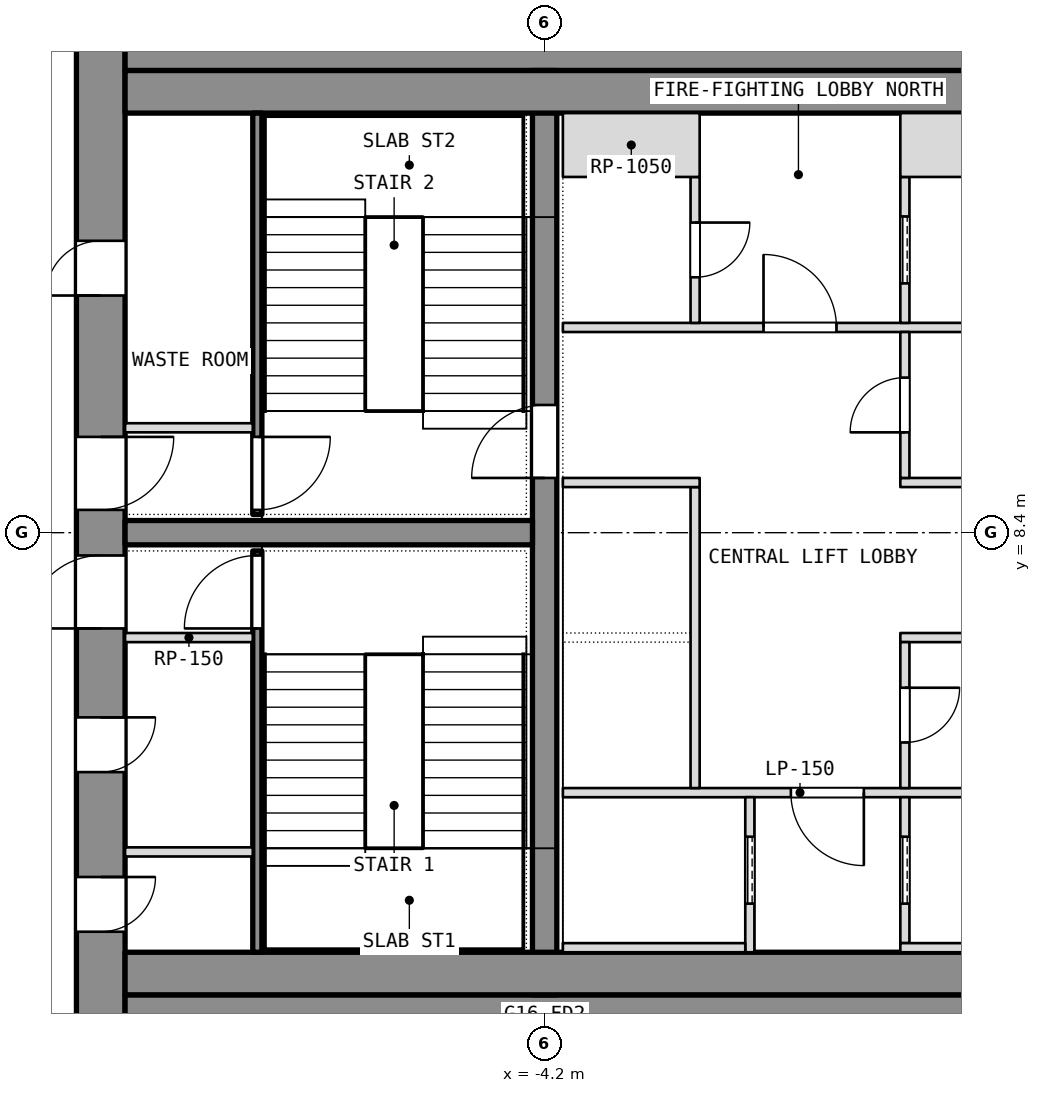
"""IFC4 building model, lengths in metres.
Left out: names, types, materials, properties, quantities, classifications, styles, units other than length and angle.
Written with IfcOpenShell. Run it as: python <this file> out.ifc"""

import sys

from ifc_helpers import new_model, si_unit, direction, frame, frame_2d, origin, place, context, subcontext, project, spatial, rectangle, extrude, element, fill, save


model = new_model("IFC4")
c1 = context("Model", 3, precision=1e-05, world=origin(), true_north=direction((0.0, 1.0)))
c2 = subcontext(c1, "Body", "Model", "MODEL_VIEW")
j1 = project(units=[si_unit("LENGTHUNIT", "METRE"), si_unit("PLANEANGLEUNIT", "RADIAN")], contexts=[c1])
p1 = place(None, origin())
s1 = spatial("IfcSite", under=j1, at=p1, CompositionType="ELEMENT")
p2 = place(p1, origin())
s2 = spatial("IfcBuilding", under=s1, at=p2, CompositionType="ELEMENT")
p3 = place(p2, frame((0.0, 0.0, 198.5)))
s3 = spatial("IfcBuildingStorey", under=s2, at=p3, CompositionType="ELEMENT", Elevation=198.5)
p4 = place(p3, frame((-11.5, 0.0, 0.0), z_axis=(0.0, 0.0, 1.0), x_axis=(0.0, 1.0, 0.0)))
e1 = element("IfcWall", 1, at=p4, inside=s3, PredefinedType="SHEAR", context=c2, shape_type="SweptSolid", body=[
    extrude(rectangle(XDim=16.8, YDim=0.8, at=frame_2d((8.4, 0.0))), origin(), (0.0, 0.0, 1.0), 3.6),
])
p5 = place(p4, frame((1.837, 0.0, 0.0)))
e2 = element("IfcOpeningElement", 2, at=p5, cuts=e1, PredefinedType="OPENING", context=c2, shape_type="SweptSolid", body=[
    extrude(rectangle(XDim=0.9, YDim=2.1, at=frame_2d((0.45, 1.05))), frame((0.0, 0.4, 0.0), z_axis=(0.0, -1.0, 0.0), x_axis=(1.0, 0.0, 0.0)), (0.0, 0.0, 1.0), 0.8),
])
p6 = place(p4, frame((4.462, 0.0, 0.0)))
e3 = element("IfcOpeningElement", 3, at=p6, cuts=e1, PredefinedType="OPENING", context=c2, shape_type="SweptSolid", body=[
    extrude(rectangle(XDim=0.9, YDim=2.1, at=frame_2d((0.45, 1.05))), frame((0.0, 0.4, 0.0), z_axis=(0.0, -1.0, 0.0), x_axis=(1.0, 0.0, 0.0)), (0.0, 0.0, 1.0), 0.8),
])
p7 = place(p4, frame((6.825, 0.0, 0.0)))
e4 = element("IfcOpeningElement", 4, at=p7, cuts=e1, PredefinedType="OPENING", context=c2, shape_type="SweptSolid", body=[
    extrude(rectangle(XDim=1.2, YDim=2.1, at=frame_2d((0.6, 1.05))), frame((0.0, 0.4, 0.0), z_axis=(0.0, -1.0, 0.0), x_axis=(1.0, 0.0, 0.0)), (0.0, 0.0, 1.0), 0.8),
])
p8 = place(p4, frame((12.3, 0.0, 0.0)))
e5 = element("IfcOpeningElement", 5, at=p8, cuts=e1, PredefinedType="OPENING", context=c2, shape_type="SweptSolid", body=[
    extrude(rectangle(XDim=0.9, YDim=2.1, at=frame_2d((0.45, 1.05))), frame((0.0, 0.4, 0.0), z_axis=(0.0, -1.0, 0.0), x_axis=(1.0, 0.0, 0.0)), (0.0, 0.0, 1.0), 0.8),
])
p9 = place(p4, frame((8.775, 0.0, 0.0)))
e6 = element("IfcOpeningElement", 6, at=p9, cuts=e1, PredefinedType="OPENING", context=c2, shape_type="SweptSolid", body=[
    extrude(rectangle(XDim=1.2, YDim=2.1, at=frame_2d((0.6, 1.05))), frame((0.0, 0.4, 0.0), z_axis=(0.0, -1.0, 0.0), x_axis=(1.0, 0.0, 0.0)), (0.0, 0.0, 1.0), 0.8),
])
for number, where, z_axis, x_axis in (
    (7, (-11.1, 0.4, 0.0), (0.0, 0.0, 1.0), (1.0, 0.0, 0.0)),
    (8, (-11.1, 16.4, 0.0), (0.0, 0.0, 1.0), (1.0, 0.0, 0.0)),
):
    element("IfcWall", number, at=place(p3, frame(where, z_axis=z_axis, x_axis=x_axis)), inside=s3, PredefinedType="SHEAR", context=c2, shape_type="SweptSolid", body=[
        extrude(rectangle(XDim=22.2, YDim=0.8, at=frame_2d((11.1, 0.0))), origin(), (0.0, 0.0, 1.0), 3.6),
    ])
p10 = place(p3, frame((-4.2, 0.8, 0.0), z_axis=(0.0, 0.0, 1.0), x_axis=(0.0, 1.0, 0.0)))
e9 = element("IfcWall", 9, at=p10, inside=s3, PredefinedType="SHEAR", context=c2, shape_type="SweptSolid", body=[
    extrude(rectangle(XDim=15.2, YDim=0.4, at=frame_2d((7.6, 0.0))), origin(), (0.0, 0.0, 1.0), 3.6),
])
p11 = place(p10, frame((8.5, 0.0, 0.0)))
e10 = element("IfcOpeningElement", 10, at=p11, cuts=e9, PredefinedType="OPENING", context=c2, shape_type="SweptSolid", body=[
    extrude(rectangle(XDim=1.2, YDim=2.1, at=frame_2d((0.6, 1.05))), frame((0.0, 0.2, 0.0), z_axis=(0.0, -1.0, 0.0), x_axis=(1.0, 0.0, 0.0)), (0.0, 0.0, 1.0), 0.4),
])
p12 = place(p3, frame((-11.1, 8.4, 0.0), z_axis=(0.0, 0.0, 1.0), x_axis=(1.0, 0.0, 0.0)))
e11 = element("IfcWall", 11, at=p12, inside=s3, PredefinedType="SHEAR", context=c2, shape_type="SweptSolid", body=[
    extrude(rectangle(XDim=6.7, YDim=0.4, at=frame_2d((3.35, 0.0))), origin(), (0.0, 0.0, 1.0), 3.6),
])
for number, where, z_axis, x_axis in (
    (12, (-11.1, 1.15, 0.0), (0.0, 0.0, 1.0), (1.0, 0.0, 0.0)),
    (13, (-11.1, 15.65, 0.0), (0.0, 0.0, 1.0), (1.0, 0.0, 0.0)),
):
    element("IfcWall", number, at=place(p3, frame(where, z_axis=z_axis, x_axis=x_axis)), inside=s3, PredefinedType="PARTITIONING", context=c2, shape_type="SweptSolid", body=[
        extrude(rectangle(XDim=22.2, YDim=0.7, at=frame_2d((11.1, 0.0))), origin(), (0.0, 0.0, 1.0), 3.34),
    ])
p13 = place(p3, frame((-8.925, 1.5, 0.0), z_axis=(0.0, 0.0, 1.0), x_axis=(0.0, 1.0, 0.0)))
e14 = element("IfcWall", 14, at=p13, inside=s3, PredefinedType="SHEAR", context=c2, shape_type="SweptSolid", body=[
    extrude(rectangle(XDim=6.6, YDim=0.15, at=frame_2d((3.3, 0.0))), origin(), (0.0, 0.0, 1.0), 3.34),
])
p14 = place(p13, frame((5.325, 0.0, 0.0)))
e15 = element("IfcOpeningElement", 15, at=p14, cuts=e14, PredefinedType="OPENING", context=c2, shape_type="SweptSolid", body=[
    extrude(rectangle(XDim=1.2, YDim=2.1, at=frame_2d((0.6, 1.05))), frame((0.0, 0.075, 0.0), z_axis=(0.0, -1.0, 0.0), x_axis=(1.0, 0.0, 0.0)), (0.0, 0.0, 1.0), 0.15),
])
for number, where, z_axis, x_axis in (
    (16, (-11.1, 6.675, 0.0), (0.0, 0.0, 1.0), (1.0, 0.0, 0.0)),
    (17, (-11.1, 3.15, 0.0), (0.0, 0.0, 1.0), (1.0, 0.0, 0.0)),
):
    element("IfcWall", number, at=place(p3, frame(where, z_axis=z_axis, x_axis=x_axis)), inside=s3, PredefinedType="PARTITIONING", context=c2, shape_type="SweptSolid", body=[
        extrude(rectangle(XDim=2.1, YDim=0.15, at=frame_2d((1.05, 0.0))), origin(), (0.0, 0.0, 1.0), 3.34),
    ])
p15 = place(p3, frame((-8.925, 8.7, 0.0), z_axis=(0.0, 0.0, 1.0), x_axis=(0.0, 1.0, 0.0)))
e18 = element("IfcWall", 18, at=p15, inside=s3, PredefinedType="SHEAR", context=c2, shape_type="SweptSolid", body=[
    extrude(rectangle(XDim=6.6, YDim=0.15, at=frame_2d((3.3, 0.0))), origin(), (0.0, 0.0, 1.0), 3.34),
])
p16 = place(p15, frame((0.075, 0.0, 0.0)))
e19 = element("IfcOpeningElement", 19, at=p16, cuts=e18, PredefinedType="OPENING", context=c2, shape_type="SweptSolid", body=[
    extrude(rectangle(XDim=1.2, YDim=2.1, at=frame_2d((0.6, 1.05))), frame((0.0, 0.075, 0.0), z_axis=(0.0, -1.0, 0.0), x_axis=(1.0, 0.0, 0.0)), (0.0, 0.0, 1.0), 0.15),
])
p17 = place(p3, frame((-11.1, 10.125, 0.0), z_axis=(0.0, 0.0, 1.0), x_axis=(1.0, 0.0, 0.0)))
e20 = element("IfcWall", 20, at=p17, inside=s3, PredefinedType="PARTITIONING", context=c2, shape_type="SweptSolid", body=[
    extrude(rectangle(XDim=2.1, YDim=0.15, at=frame_2d((1.05, 0.0))), origin(), (0.0, 0.0, 1.0), 3.34),
])
p18 = place(p3, frame((-3.9, 4.125, 0.0), z_axis=(0.0, 0.0, 1.0), x_axis=(1.0, 0.0, 0.0)))
e21 = element("IfcWall", 21, at=p18, inside=s3, PredefinedType="PARTITIONING", context=c2, shape_type="SweptSolid", body=[
    extrude(rectangle(XDim=7.8, YDim=0.15, at=frame_2d((3.9, 0.0))), origin(), (0.0, 0.0, 1.0), 3.34),
])
p19 = place(p18, frame((3.75, 0.0, 0.0)))
e22 = element("IfcOpeningElement", 22, at=p19, cuts=e21, PredefinedType="OPENING", context=c2, shape_type="SweptSolid", body=[
    extrude(rectangle(XDim=1.2, YDim=2.1, at=frame_2d((0.6, 1.05))), frame((0.0, 0.075, 0.0), z_axis=(0.0, -1.0, 0.0), x_axis=(1.0, 0.0, 0.0)), (0.0, 0.0, 1.0), 0.15),
])
p20 = place(p3, frame((-3.9, 11.775, 0.0), z_axis=(0.0, 0.0, 1.0), x_axis=(1.0, 0.0, 0.0)))
e23 = element("IfcWall", 23, at=p20, inside=s3, PredefinedType="PARTITIONING", context=c2, shape_type="SweptSolid", body=[
    extrude(rectangle(XDim=7.8, YDim=0.15, at=frame_2d((3.9, 0.0))), origin(), (0.0, 0.0, 1.0), 3.34),
])
p21 = place(p20, frame((3.3, 0.0, 0.0)))
e24 = element("IfcOpeningElement", 24, at=p21, cuts=e23, PredefinedType="OPENING", context=c2, shape_type="SweptSolid", body=[
    extrude(rectangle(XDim=1.2, YDim=2.1, at=frame_2d((0.6, 1.05))), frame((0.0, 0.075, 0.0), z_axis=(0.0, -1.0, 0.0), x_axis=(1.0, 0.0, 0.0)), (0.0, 0.0, 1.0), 0.15),
])
p22 = place(p3, frame((-0.825, 1.5, 0.0), z_axis=(0.0, 0.0, 1.0), x_axis=(0.0, 1.0, 0.0)))
e25 = element("IfcWall", 25, at=p22, inside=s3, PredefinedType="SHEAR", context=c2, shape_type="SweptSolid", body=[
    extrude(rectangle(XDim=2.55, YDim=0.15, at=frame_2d((1.275, 0.0))), origin(), (0.0, 0.0, 1.0), 3.6),
])
p23 = place(p22, frame((0.8, 0.0, 0.0)))
e26 = element("IfcOpeningElement", 26, at=p23, cuts=e25, PredefinedType="OPENING", context=c2, shape_type="SweptSolid", body=[
    extrude(rectangle(XDim=1.1, YDim=2.1, at=frame_2d((0.55, 1.05))), frame((0.0, 0.075, 0.0), z_axis=(0.0, -1.0, 0.0), x_axis=(1.0, 0.0, 0.0)), (0.0, 0.0, 1.0), 0.15),
])
p24 = place(p3, frame((-3.9, 1.575, 0.0), z_axis=(0.0, 0.0, 1.0), x_axis=(1.0, 0.0, 0.0)))
e27 = element("IfcWall", 27, at=p24, inside=s3, PredefinedType="SHEAR", context=c2, shape_type="SweptSolid", body=[
    extrude(rectangle(XDim=3.0, YDim=0.15, at=frame_2d((1.5, 0.0))), origin(), (0.0, 0.0, 1.0), 3.6),
])
p25 = place(p3, frame((-1.725, 4.2, 0.0), z_axis=(0.0, 0.0, 1.0), x_axis=(0.0, 1.0, 0.0)))
e28 = element("IfcWall", 28, at=p25, inside=s3, PredefinedType="SHEAR", context=c2, shape_type="SweptSolid", body=[
    extrude(rectangle(XDim=4.95, YDim=0.15, at=frame_2d((2.475, 0.0))), origin(), (0.0, 0.0, 1.0), 3.6),
])
p26 = place(p3, frame((-3.9, 9.225, 0.0), z_axis=(0.0, 0.0, 1.0), x_axis=(1.0, 0.0, 0.0)))
e29 = element("IfcWall", 29, at=p26, inside=s3, PredefinedType="SHEAR", context=c2, shape_type="SweptSolid", body=[
    extrude(rectangle(XDim=2.25, YDim=0.15, at=frame_2d((1.125, 0.0))), origin(), (0.0, 0.0, 1.0), 3.6),
])
p27 = place(p3, frame((-1.725, 11.85, 0.0), z_axis=(0.0, 0.0, 1.0), x_axis=(0.0, 1.0, 0.0)))
e30 = element("IfcWall", 30, at=p27, inside=s3, PredefinedType="PARTITIONING", context=c2, shape_type="SweptSolid", body=[
    extrude(rectangle(XDim=2.4, YDim=0.15, at=frame_2d((1.2, 0.0))), origin(), (0.0, 0.0, 1.0), 3.34),
])
p28 = place(p27, frame((0.75, 0.0, 0.0)))
e31 = element("IfcOpeningElement", 31, at=p28, cuts=e30, PredefinedType="OPENING", context=c2, shape_type="SweptSolid", body=[
    extrude(rectangle(XDim=0.9, YDim=2.1, at=frame_2d((0.45, 1.05))), frame((0.0, 0.075, 0.0), z_axis=(0.0, -1.0, 0.0), x_axis=(1.0, 0.0, 0.0)), (0.0, 0.0, 1.0), 0.15),
])
p29 = place(p3, frame((-3.9, 14.775, 0.0), z_axis=(0.0, 0.0, 1.0), x_axis=(1.0, 0.0, 0.0)))
e32 = element("IfcWall", 32, at=p29, inside=s3, PredefinedType="PARTITIONING", context=c2, shape_type="SweptSolid", body=[
    extrude(rectangle(XDim=2.25, YDim=1.05, at=frame_2d((1.125, 0.0))), origin(), (0.0, 0.0, 1.0), 3.34),
])
p30 = place(p3, frame((1.725, 1.65, 0.0), z_axis=(0.0, 0.0, 1.0), x_axis=(0.0, 1.0, 0.0)))
e33 = element("IfcWall", 33, at=p30, inside=s3, PredefinedType="SHEAR", context=c2, shape_type="SweptSolid", body=[
    extrude(rectangle(XDim=2.4, YDim=0.15, at=frame_2d((1.2, 0.0))), origin(), (0.0, 0.0, 1.0), 3.6),
])
p31 = place(p30, frame((0.65, 0.0, 0.0)))
e34 = element("IfcOpeningElement", 34, at=p31, cuts=e33, PredefinedType="OPENING", context=c2, shape_type="SweptSolid", body=[
    extrude(rectangle(XDim=1.1, YDim=2.1, at=frame_2d((0.55, 1.05))), frame((0.0, 0.075, 0.0), z_axis=(0.0, -1.0, 0.0), x_axis=(1.0, 0.0, 0.0)), (0.0, 0.0, 1.0), 0.15),
])
p32 = place(p3, frame((1.65, 1.575, 0.0), z_axis=(0.0, 0.0, 1.0), x_axis=(1.0, 0.0, 0.0)))
e35 = element("IfcWall", 35, at=p32, inside=s3, PredefinedType="SHEAR", context=c2, shape_type="SweptSolid", body=[
    extrude(rectangle(XDim=2.25, YDim=0.15, at=frame_2d((1.125, 0.0))), origin(), (0.0, 0.0, 1.0), 3.6),
])
p33 = place(p3, frame((1.725, 11.85, 0.0), z_axis=(0.0, 0.0, 1.0), x_axis=(0.0, 1.0, 0.0)))
e36 = element("IfcWall", 36, at=p33, inside=s3, PredefinedType="SHEAR", context=c2, shape_type="SweptSolid", body=[
    extrude(rectangle(XDim=2.4, YDim=0.15, at=frame_2d((1.2, 0.0))), origin(), (0.0, 0.0, 1.0), 3.6),
])
p34 = place(p33, frame((0.65, 0.0, 0.0)))
e37 = element("IfcOpeningElement", 37, at=p34, cuts=e36, PredefinedType="OPENING", context=c2, shape_type="SweptSolid", body=[
    extrude(rectangle(XDim=1.1, YDim=2.1, at=frame_2d((0.55, 1.05))), frame((0.0, 0.075, 0.0), z_axis=(0.0, -1.0, 0.0), x_axis=(1.0, 0.0, 0.0)), (0.0, 0.0, 1.0), 0.15),
])
p35 = place(p3, frame((1.65, 14.775, 0.0), z_axis=(0.0, 0.0, 1.0), x_axis=(1.0, 0.0, 0.0)))
e38 = element("IfcWall", 38, at=p35, inside=s3, PredefinedType="SHEAR", context=c2, shape_type="SweptSolid", body=[
    extrude(rectangle(XDim=2.25, YDim=1.05, at=frame_2d((1.125, 0.0))), origin(), (0.0, 0.0, 1.0), 3.6),
])
for number, where, z_axis, x_axis in (
    (39, (1.65, 6.675, 0.0), (0.0, 0.0, 1.0), (1.0, 0.0, 0.0)),
    (40, (1.65, 9.225, 0.0), (0.0, 0.0, 1.0), (1.0, 0.0, 0.0)),
):
    element("IfcWall", number, at=place(p3, frame(where, z_axis=z_axis, x_axis=x_axis)), inside=s3, PredefinedType="PARTITIONING", context=c2, shape_type="SweptSolid", body=[
        extrude(rectangle(XDim=2.25, YDim=0.15, at=frame_2d((1.125, 0.0))), origin(), (0.0, 0.0, 1.0), 3.34),
    ])
p36 = place(p3, frame((1.725, 4.2, 0.0), z_axis=(0.0, 0.0, 1.0), x_axis=(0.0, 1.0, 0.0)))
e41 = element("IfcWall", 41, at=p36, inside=s3, PredefinedType="PARTITIONING", context=c2, shape_type="SweptSolid", body=[
    extrude(rectangle(XDim=2.4, YDim=0.15, at=frame_2d((1.2, 0.0))), origin(), (0.0, 0.0, 1.0), 3.34),
])
p37 = place(p36, frame((0.75, 0.0, 0.0)))
e42 = element("IfcOpeningElement", 42, at=p37, cuts=e41, PredefinedType="OPENING", context=c2, shape_type="SweptSolid", body=[
    extrude(rectangle(XDim=0.9, YDim=2.1, at=frame_2d((0.45, 1.05))), frame((0.0, 0.075, 0.0), z_axis=(0.0, -1.0, 0.0), x_axis=(1.0, 0.0, 0.0)), (0.0, 0.0, 1.0), 0.15),
])
p38 = place(p3, frame((1.725, 9.3, 0.0), z_axis=(0.0, 0.0, 1.0), x_axis=(0.0, 1.0, 0.0)))
e43 = element("IfcWall", 43, at=p38, inside=s3, PredefinedType="PARTITIONING", context=c2, shape_type="SweptSolid", body=[
    extrude(rectangle(XDim=2.4, YDim=0.15, at=frame_2d((1.2, 0.0))), origin(), (0.0, 0.0, 1.0), 3.34),
])
p39 = place(p38, frame((0.75, 0.0, 0.0)))
e44 = element("IfcOpeningElement", 44, at=p39, cuts=e43, PredefinedType="OPENING", context=c2, shape_type="SweptSolid", body=[
    extrude(rectangle(XDim=0.9, YDim=2.1, at=frame_2d((0.45, 1.05))), frame((0.0, 0.075, 0.0), z_axis=(0.0, -1.0, 0.0), x_axis=(1.0, 0.0, 0.0)), (0.0, 0.0, 1.0), 0.15),
])
p40 = place(p5, origin())
e45 = element("IfcDoor", 45, at=p40, inside=s3, OperationType="SINGLE_SWING_LEFT", PredefinedType="DOOR", context=c2, shape_type="SweptSolid", body=[
    extrude(rectangle(XDim=0.9, YDim=2.1, at=frame_2d((0.45, 1.05))), frame((0.0, 0.025, 0.0), z_axis=(0.0, -1.0, 0.0), x_axis=(1.0, 0.0, 0.0)), (0.0, 0.0, 1.0), 0.05),
])
fill(e2, e45)
p41 = place(p6, origin())
e46 = element("IfcDoor", 46, at=p41, inside=s3, OperationType="SINGLE_SWING_LEFT", PredefinedType="DOOR", context=c2, shape_type="SweptSolid", body=[
    extrude(rectangle(XDim=0.9, YDim=2.1, at=frame_2d((0.45, 1.05))), frame((0.0, 0.025, 0.0), z_axis=(0.0, -1.0, 0.0), x_axis=(1.0, 0.0, 0.0)), (0.0, 0.0, 1.0), 0.05),
])
fill(e3, e46)
p42 = place(p7, origin())
e47 = element("IfcDoor", 47, at=p42, inside=s3, OperationType="SINGLE_SWING_LEFT", PredefinedType="DOOR", context=c2, shape_type="SweptSolid", body=[
    extrude(rectangle(XDim=1.2, YDim=2.1, at=frame_2d((0.6, 1.05))), frame((0.0, 0.025, 0.0), z_axis=(0.0, -1.0, 0.0), x_axis=(1.0, 0.0, 0.0)), (0.0, 0.0, 1.0), 0.05),
])
fill(e4, e47)
p43 = place(p14, origin())
e48 = element("IfcDoor", 48, at=p43, inside=s3, OperationType="SINGLE_SWING_LEFT", PredefinedType="DOOR", context=c2, shape_type="SweptSolid", body=[
    extrude(rectangle(XDim=1.2, YDim=2.1, at=frame_2d((0.6, 1.05))), frame((0.0, 0.025, 0.0), z_axis=(0.0, -1.0, 0.0), x_axis=(1.0, 0.0, 0.0)), (0.0, 0.0, 1.0), 0.05),
])
fill(e15, e48)
p44 = place(p8, origin())
e49 = element("IfcDoor", 49, at=p44, inside=s3, OperationType="SINGLE_SWING_LEFT", PredefinedType="DOOR", context=c2, shape_type="SweptSolid", body=[
    extrude(rectangle(XDim=0.9, YDim=2.1, at=frame_2d((0.45, 1.05))), frame((0.0, 0.025, 0.0), z_axis=(0.0, -1.0, 0.0), x_axis=(1.0, 0.0, 0.0)), (0.0, 0.0, 1.0), 0.05),
])
fill(e5, e49)
p45 = place(p9, origin())
e50 = element("IfcDoor", 50, at=p45, inside=s3, OperationType="SINGLE_SWING_LEFT", PredefinedType="DOOR", context=c2, shape_type="SweptSolid", body=[
    extrude(rectangle(XDim=1.2, YDim=2.1, at=frame_2d((0.6, 1.05))), frame((0.0, 0.025, 0.0), z_axis=(0.0, -1.0, 0.0), x_axis=(1.0, 0.0, 0.0)), (0.0, 0.0, 1.0), 0.05),
])
fill(e6, e50)
p46 = place(p16, origin())
e51 = element("IfcDoor", 51, at=p46, inside=s3, OperationType="SINGLE_SWING_LEFT", PredefinedType="DOOR", context=c2, shape_type="SweptSolid", body=[
    extrude(rectangle(XDim=1.2, YDim=2.1, at=frame_2d((0.6, 1.05))), frame((0.0, 0.025, 0.0), z_axis=(0.0, -1.0, 0.0), x_axis=(1.0, 0.0, 0.0)), (0.0, 0.0, 1.0), 0.05),
])
fill(e19, e51)
p47 = place(p37, origin())
e52 = element("IfcDoor", 52, at=p47, inside=s3, OperationType="SINGLE_SWING_LEFT", PredefinedType="DOOR", context=c2, shape_type="SweptSolid", body=[
    extrude(rectangle(XDim=0.9, YDim=2.1, at=frame_2d((0.45, 1.05))), frame((0.0, 0.025, 0.0), z_axis=(0.0, -1.0, 0.0), x_axis=(1.0, 0.0, 0.0)), (0.0, 0.0, 1.0), 0.05),
])
fill(e42, e52)
p48 = place(p39, origin())
e53 = element("IfcDoor", 53, at=p48, inside=s3, OperationType="SINGLE_SWING_LEFT", PredefinedType="DOOR", context=c2, shape_type="SweptSolid", body=[
    extrude(rectangle(XDim=0.9, YDim=2.1, at=frame_2d((0.45, 1.05))), frame((0.0, 0.025, 0.0), z_axis=(0.0, -1.0, 0.0), x_axis=(1.0, 0.0, 0.0)), (0.0, 0.0, 1.0), 0.05),
])
fill(e44, e53)
p49 = place(p23, origin())
e54 = element("IfcDoor", 54, at=p49, inside=s3, OperationType="SLIDING_TO_LEFT", PredefinedType="DOOR", context=c2, shape_type="SweptSolid", body=[
    extrude(rectangle(XDim=1.1, YDim=2.1, at=frame_2d((0.55, 1.05))), frame((0.0, 0.025, 0.0), z_axis=(0.0, -1.0, 0.0), x_axis=(1.0, 0.0, 0.0)), (0.0, 0.0, 1.0), 0.05),
])
fill(e26, e54)
p50 = place(p31, origin())
e55 = element("IfcDoor", 55, at=p50, inside=s3, OperationType="SLIDING_TO_LEFT", PredefinedType="DOOR", context=c2, shape_type="SweptSolid", body=[
    extrude(rectangle(XDim=1.1, YDim=2.1, at=frame_2d((0.55, 1.05))), frame((0.0, 0.025, 0.0), z_axis=(0.0, -1.0, 0.0), x_axis=(1.0, 0.0, 0.0)), (0.0, 0.0, 1.0), 0.05),
])
fill(e34, e55)
p51 = place(p34, origin())
e56 = element("IfcDoor", 56, at=p51, inside=s3, OperationType="SLIDING_TO_LEFT", PredefinedType="DOOR", context=c2, shape_type="SweptSolid", body=[
    extrude(rectangle(XDim=1.1, YDim=2.1, at=frame_2d((0.55, 1.05))), frame((0.0, 0.025, 0.0), z_axis=(0.0, -1.0, 0.0), x_axis=(1.0, 0.0, 0.0)), (0.0, 0.0, 1.0), 0.05),
])
fill(e37, e56)
p52 = place(p19, origin())
e57 = element("IfcDoor", 57, at=p52, inside=s3, OperationType="SINGLE_SWING_LEFT", PredefinedType="DOOR", context=c2, shape_type="SweptSolid", body=[
    extrude(rectangle(XDim=1.2, YDim=2.1, at=frame_2d((0.6, 1.05))), frame((0.0, 0.025, 0.0), z_axis=(0.0, -1.0, 0.0), x_axis=(1.0, 0.0, 0.0)), (0.0, 0.0, 1.0), 0.05),
])
fill(e22, e57)
p53 = place(p21, origin())
e58 = element("IfcDoor", 58, at=p53, inside=s3, OperationType="SINGLE_SWING_LEFT", PredefinedType="DOOR", context=c2, shape_type="SweptSolid", body=[
    extrude(rectangle(XDim=1.2, YDim=2.1, at=frame_2d((0.6, 1.05))), frame((0.0, 0.025, 0.0), z_axis=(0.0, -1.0, 0.0), x_axis=(1.0, 0.0, 0.0)), (0.0, 0.0, 1.0), 0.05),
])
fill(e24, e58)
p54 = place(p28, origin())
e59 = element("IfcDoor", 59, at=p54, inside=s3, OperationType="SINGLE_SWING_LEFT", PredefinedType="DOOR", context=c2, shape_type="SweptSolid", body=[
    extrude(rectangle(XDim=0.9, YDim=2.1, at=frame_2d((0.45, 1.05))), frame((0.0, 0.025, 0.0), z_axis=(0.0, -1.0, 0.0), x_axis=(1.0, 0.0, 0.0)), (0.0, 0.0, 1.0), 0.05),
])
fill(e31, e59)
p55 = place(p11, origin())
e60 = element("IfcDoor", 60, at=p55, inside=s3, OperationType="SINGLE_SWING_LEFT", PredefinedType="DOOR", context=c2, shape_type="SweptSolid", body=[
    extrude(rectangle(XDim=1.2, YDim=2.1, at=frame_2d((0.6, 1.05))), frame((0.0, 0.025, 0.0), z_axis=(0.0, -1.0, 0.0), x_axis=(1.0, 0.0, 0.0)), (0.0, 0.0, 1.0), 0.05),
])
fill(e10, e60)
save(model, sys.argv[1])
